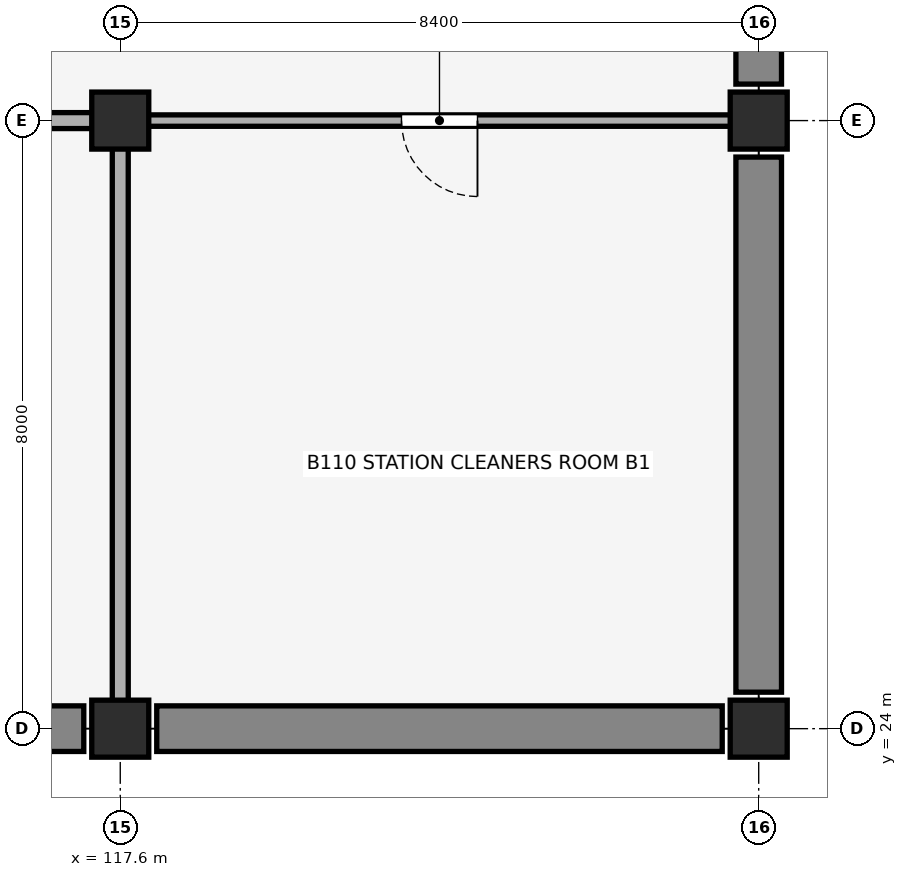
"""IFC4 building model, lengths in metres.
Left out: names, types, materials, properties, quantities, classifications, styles, units other than length and angle.
Written with IfcOpenShell. Run it as: python <this file> out.ifc"""

import sys

from ifc_helpers import new_model, si_unit, direction, frame, frame_2d, origin, origin_2d, place, context, subcontext, project, spatial, rectangle, extrude, element, fill, save


model = new_model("IFC4")
c1 = context("Model", 3, precision=1e-05, world=origin(), true_north=direction((0.0, 1.0)))
c2 = subcontext(c1, "Body", "Model", "MODEL_VIEW")
j1 = project(units=[si_unit("LENGTHUNIT", "METRE"), si_unit("PLANEANGLEUNIT", "RADIAN")], contexts=[c1])
p1 = place(None, origin())
s1 = spatial("IfcSite", under=j1, at=p1, CompositionType="ELEMENT")
p2 = place(p1, origin())
s2 = spatial("IfcBuilding", under=s1, at=p2, CompositionType="ELEMENT")
p3 = place(p2, frame((0.0, 0.0, -5.44)))
s3 = spatial("IfcBuildingStorey", under=s2, at=p3, CompositionType="ELEMENT", Elevation=-5.44)
p4 = place(p3, frame((109.68, 24.0, 0.0), z_axis=(0.0, 0.0, 1.0), x_axis=(1.0, 0.0, 0.0)))
e1 = element("IfcWall", 1, at=p4, inside=s3, PredefinedType="SOLIDWALL", context=c2, shape_type="SweptSolid", body=[
    extrude(rectangle(XDim=7.44, YDim=0.6, at=frame_2d((3.72, 0.0))), origin(), (0.0, 0.0, 1.0), 5.02),
])
p5 = place(p3, frame((118.08, 24.0, 0.0), z_axis=(0.0, 0.0, 1.0), x_axis=(1.0, 0.0, 0.0)))
e2 = element("IfcWall", 2, at=p5, inside=s3, PredefinedType="SOLIDWALL", context=c2, shape_type="SweptSolid", body=[
    extrude(rectangle(XDim=7.44, YDim=0.6, at=frame_2d((3.72, 0.0))), origin(), (0.0, 0.0, 1.0), 5.02),
])
for number, where, z_axis, x_axis in (
    (3, (126.0, 24.48, 0.0), (0.0, 0.0, 1.0), (0.0, 1.0, 0.0)),
    (4, (126.0, 32.48, 0.0), (0.0, 0.0, 1.0), (0.0, 1.0, 0.0)),
):
    element("IfcWall", number, at=place(p3, frame(where, z_axis=z_axis, x_axis=x_axis)), inside=s3, PredefinedType="SOLIDWALL", context=c2, shape_type="SweptSolid", body=[
        extrude(rectangle(XDim=7.04, YDim=0.6, at=frame_2d((3.52, 0.0))), origin(), (0.0, 0.0, 1.0), 5.02),
    ])
for number, where, z_axis, x_axis in (
    (5, (117.6, 24.0, 0.0), (0.0, 0.0, 1.0), (1.0, 0.0, 0.0)),
    (6, (117.6, 32.0, 0.0), (0.0, 0.0, 1.0), (1.0, 0.0, 0.0)),
    (7, (126.0, 24.0, 0.0), (0.0, 0.0, 1.0), (1.0, 0.0, 0.0)),
    (8, (126.0, 32.0, 0.0), (0.0, 0.0, 1.0), (1.0, 0.0, 0.0)),
):
    element("IfcColumn", number, at=place(p3, frame(where, z_axis=z_axis, x_axis=x_axis)), inside=s3, PredefinedType="COLUMN", context=c2, shape_type="SweptSolid", body=[
        extrude(rectangle(XDim=0.75, YDim=0.75, at=origin_2d()), origin(), (0.0, 0.0, 1.0), 5.02),
    ])
p6 = place(p3, frame((109.565, 32.0, 0.0), z_axis=(0.0, 0.0, 1.0), x_axis=(1.0, 0.0, 0.0)))
e9 = element("IfcWall", 9, at=p6, inside=s3, PredefinedType="PLUMBINGWALL", context=c2, shape_type="SweptSolid", body=[
    extrude(rectangle(XDim=7.67, YDim=0.21, at=frame_2d((3.835, 0.0))), origin(), (0.0, 0.0, 1.0), 4.07),
])
p7 = place(p6, frame((4.235, 0.0, 0.0), z_axis=(0.0, 0.0, 1.0), x_axis=(-1.0, 0.0, 0.0)))
e10 = element("IfcOpeningElement", 10, at=p7, cuts=e9, PredefinedType="OPENING", context=c2, shape_type="SweptSolid", body=[
    extrude(rectangle(XDim=0.9, YDim=2.15, at=frame_2d((0.45, 1.075))), frame((0.0, 0.115, 0.0), z_axis=(0.0, -1.0, 0.0), x_axis=(1.0, 0.0, 0.0)), (0.0, 0.0, 1.0), 0.23),
])
p8 = place(p3, frame((117.965, 32.0, 0.0), z_axis=(0.0, 0.0, 1.0), x_axis=(1.0, 0.0, 0.0)))
e11 = element("IfcWall", 11, at=p8, inside=s3, PredefinedType="PARTITIONING", context=c2, shape_type="SweptSolid", body=[
    extrude(rectangle(XDim=7.67, YDim=0.15, at=frame_2d((3.835, 0.0))), origin(), (0.0, 0.0, 1.0), 4.07),
])
p9 = place(p8, frame((4.335, 0.0, 0.0), z_axis=(0.0, 0.0, 1.0), x_axis=(-1.0, 0.0, 0.0)))
e12 = element("IfcOpeningElement", 12, at=p9, cuts=e11, PredefinedType="OPENING", context=c2, shape_type="SweptSolid", body=[
    extrude(rectangle(XDim=1.0, YDim=2.15, at=frame_2d((0.5, 1.075))), frame((0.0, 0.085, 0.0), z_axis=(0.0, -1.0, 0.0), x_axis=(1.0, 0.0, 0.0)), (0.0, 0.0, 1.0), 0.17),
])
p10 = place(p3, frame((117.6, 24.365, 0.0), z_axis=(0.0, 0.0, 1.0), x_axis=(0.0, 1.0, 0.0)))
e13 = element("IfcWall", 13, at=p10, inside=s3, PredefinedType="PLUMBINGWALL", context=c2, shape_type="SweptSolid", body=[
    extrude(rectangle(XDim=7.27, YDim=0.21, at=frame_2d((3.635, 0.0))), origin(), (0.0, 0.0, 1.0), 4.37),
])
p11 = place(p9, origin())
e14 = element("IfcDoor", 14, at=p11, inside=s3, OperationType="SINGLE_SWING_LEFT", PredefinedType="DOOR", context=c2, shape_type="SweptSolid", body=[
    extrude(rectangle(XDim=1.0, YDim=2.15, at=frame_2d((0.5, 1.075))), frame((0.0, 0.025, 0.0), z_axis=(0.0, -1.0, 0.0), x_axis=(1.0, 0.0, 0.0)), (0.0, 0.0, 1.0), 0.05),
])
fill(e12, e14)
save(model, sys.argv[1])
